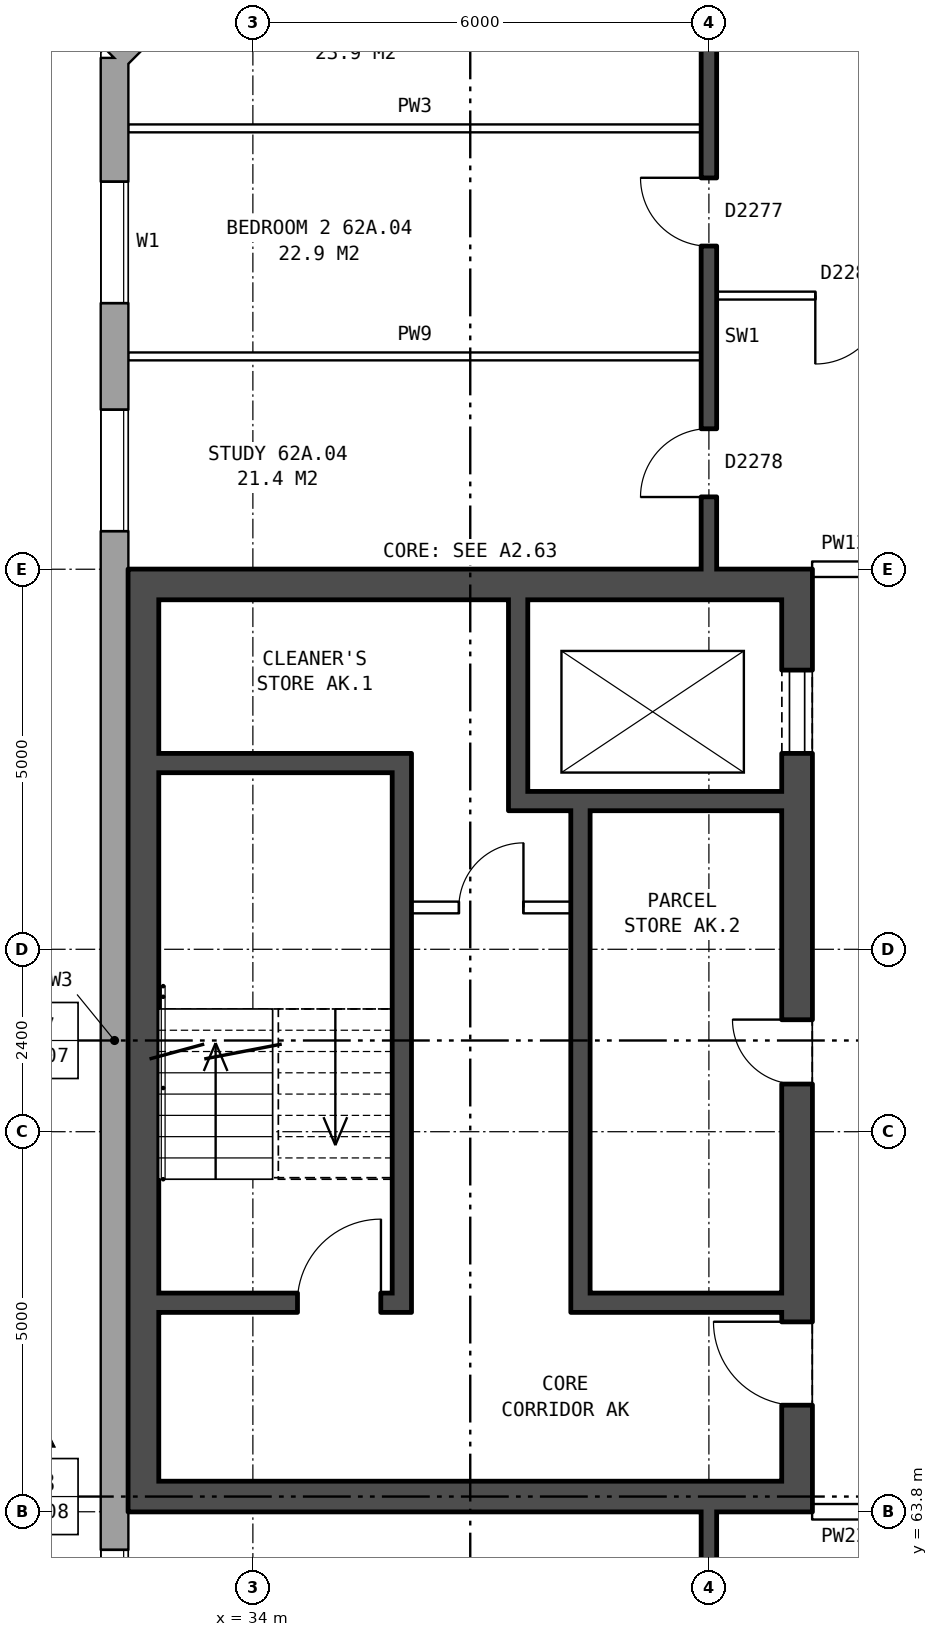
"""IFC4 building model, lengths in metres.
Left out: names, types, materials, properties, quantities, classifications, styles, units other than length and angle.
Written with IfcOpenShell. Run it as: python <this file> out.ifc"""

import sys

from ifc_helpers import new_model, si_unit, direction, frame, frame_2d, origin, place, context, subcontext, project, spatial, rectangle, extrude, element, fill, save


model = new_model("IFC4")
c1 = context("Model", 3, precision=1e-05, world=origin(), true_north=direction((0.0, 1.0)))
c2 = subcontext(c1, "Body", "Model", "MODEL_VIEW")
j1 = project(units=[si_unit("LENGTHUNIT", "METRE"), si_unit("PLANEANGLEUNIT", "RADIAN")], contexts=[c1])
p1 = place(None, origin())
s1 = spatial("IfcSite", under=j1, at=p1, CompositionType="ELEMENT")
p2 = place(p1, origin())
s2 = spatial("IfcBuilding", under=s1, at=p2, CompositionType="ELEMENT")
p3 = place(p2, frame((0.0, 0.0, 221.4)))
s3 = spatial("IfcBuildingStorey", under=s2, at=p3, CompositionType="ELEMENT", Elevation=221.4)
p4 = place(p3, frame((35.075, 85.82, 0.0), z_axis=(0.0, 0.0, 1.0), x_axis=(-0.707106781187, -0.707106781187, 0.0)))
e1 = element("IfcWall", 1, at=p4, inside=s3, PredefinedType="STANDARD", context=c2, shape_type="SweptSolid", body=[
    extrude(rectangle(XDim=4.094, YDim=0.36, at=frame_2d((2.047, 0.0))), origin(), (0.0, 0.0, 1.0), 2.85),
])
p5 = place(p4, frame((1.247, 0.0, 0.8)))
e2 = element("IfcOpeningElement", 2, at=p5, cuts=e1, PredefinedType="OPENING", context=c2, shape_type="SweptSolid", body=[
    extrude(rectangle(XDim=1.6, YDim=1.8, at=frame_2d((0.8, 0.9))), frame((0.0, 0.19, 0.0), z_axis=(0.0, -1.0, 0.0), x_axis=(1.0, 0.0, 0.0)), (0.0, 0.0, 1.0), 0.38),
])
p6 = place(p3, frame((32.18, 82.925, 0.0), z_axis=(0.0, 0.0, 1.0), x_axis=(0.0, -1.0, 0.0)))
e3 = element("IfcWall", 3, at=p6, inside=s3, PredefinedType="STANDARD", context=c2, shape_type="SweptSolid", body=[
    extrude(rectangle(XDim=25.851, YDim=0.36, at=frame_2d((12.925, 0.0))), origin(), (0.0, 0.0, 1.0), 2.85),
])
p7 = place(p6, frame((1.625, 0.0, 0.8)))
e4 = element("IfcOpeningElement", 4, at=p7, cuts=e3, PredefinedType="OPENING", context=c2, shape_type="SweptSolid", body=[
    extrude(rectangle(XDim=1.6, YDim=1.8, at=frame_2d((0.8, 0.9))), frame((0.0, 0.19, 0.0), z_axis=(0.0, -1.0, 0.0), x_axis=(1.0, 0.0, 0.0)), (0.0, 0.0, 1.0), 0.38),
])
p8 = place(p6, frame((4.625, 0.0, 0.8)))
e5 = element("IfcOpeningElement", 5, at=p8, cuts=e3, PredefinedType="OPENING", context=c2, shape_type="SweptSolid", body=[
    extrude(rectangle(XDim=1.6, YDim=1.8, at=frame_2d((0.8, 0.9))), frame((0.0, 0.19, 0.0), z_axis=(0.0, -1.0, 0.0), x_axis=(1.0, 0.0, 0.0)), (0.0, 0.0, 1.0), 0.38),
])
p9 = place(p6, frame((19.625, 0.0, 0.8)))
e6 = element("IfcOpeningElement", 6, at=p9, cuts=e3, PredefinedType="OPENING", context=c2, shape_type="SweptSolid", body=[
    extrude(rectangle(XDim=1.6, YDim=1.8, at=frame_2d((0.8, 0.9))), frame((0.0, 0.19, 0.0), z_axis=(0.0, -1.0, 0.0), x_axis=(1.0, 0.0, 0.0)), (0.0, 0.0, 1.0), 0.38),
])
p10 = place(p6, frame((22.625, 0.0, 0.8)))
e7 = element("IfcOpeningElement", 7, at=p10, cuts=e3, PredefinedType="OPENING", context=c2, shape_type="SweptSolid", body=[
    extrude(rectangle(XDim=1.6, YDim=1.8, at=frame_2d((0.8, 0.9))), frame((0.0, 0.19, 0.0), z_axis=(0.0, -1.0, 0.0), x_axis=(1.0, 0.0, 0.0)), (0.0, 0.0, 1.0), 0.38),
])
p11 = place(p3, frame((41.16, 76.2, 0.0), z_axis=(0.0, 0.0, 1.0), x_axis=(0.0, -1.0, 0.0)))
e8 = element("IfcWall", 8, at=p11, inside=s3, PredefinedType="SHEAR", context=c2, shape_type="SweptSolid", body=[
    extrude(rectangle(XDim=12.4, YDim=0.4, at=frame_2d((6.2, 0.0))), origin(), (0.0, 0.0, 1.0), 2.85),
])
p12 = place(p11, frame((1.325, 0.0, 0.0)))
e9 = element("IfcOpeningElement", 9, at=p12, cuts=e8, PredefinedType="OPENING", context=c2, shape_type="SweptSolid", body=[
    extrude(rectangle(XDim=1.1, YDim=2.1, at=frame_2d((0.55, 1.05))), frame((0.0, 0.21, 0.0), z_axis=(0.0, -1.0, 0.0), x_axis=(1.0, 0.0, 0.0)), (0.0, 0.0, 1.0), 0.42),
])
p13 = place(p11, frame((5.925, 0.0, 0.0)))
e10 = element("IfcOpeningElement", 10, at=p13, cuts=e8, PredefinedType="OPENING", context=c2, shape_type="SweptSolid", body=[
    extrude(rectangle(XDim=0.85, YDim=2.1, at=frame_2d((0.425, 1.05))), frame((0.0, 0.21, 0.0), z_axis=(0.0, -1.0, 0.0), x_axis=(1.0, 0.0, 0.0)), (0.0, 0.0, 1.0), 0.42),
])
p14 = place(p11, frame((9.9, 0.0, 0.0)))
e11 = element("IfcOpeningElement", 11, at=p14, cuts=e8, PredefinedType="OPENING", context=c2, shape_type="SweptSolid", body=[
    extrude(rectangle(XDim=1.1, YDim=2.1, at=frame_2d((0.55, 1.05))), frame((0.0, 0.21, 0.0), z_axis=(0.0, -1.0, 0.0), x_axis=(1.0, 0.0, 0.0)), (0.0, 0.0, 1.0), 0.42),
])
p15 = place(p3, frame((32.56, 76.2, 0.0), z_axis=(0.0, 0.0, 1.0), x_axis=(0.0, -1.0, 0.0)))
e12 = element("IfcWall", 12, at=p15, inside=s3, PredefinedType="SHEAR", context=c2, shape_type="SweptSolid", body=[
    extrude(rectangle(XDim=12.4, YDim=0.4, at=frame_2d((6.2, 0.0))), origin(), (0.0, 0.0, 1.0), 2.85),
])
for number, where, z_axis, x_axis in (
    (13, (40.96, 76.0, 0.0), (0.0, 0.0, 1.0), (-1.0, 0.0, 0.0)),
    (14, (40.96, 64.0, 0.0), (0.0, 0.0, 1.0), (-1.0, 0.0, 0.0)),
):
    element("IfcWall", number, at=place(p3, frame(where, z_axis=z_axis, x_axis=x_axis)), inside=s3, PredefinedType="SHEAR", context=c2, shape_type="SweptSolid", body=[
        extrude(rectangle(XDim=8.2, YDim=0.4, at=frame_2d((4.1, 0.0))), origin(), (0.0, 0.0, 1.0), 2.85),
    ])
p16 = place(p3, frame((35.835, 73.65, 0.0), z_axis=(0.0, 0.0, 1.0), x_axis=(-1.0, 0.0, 0.0)))
e15 = element("IfcWall", 15, at=p16, inside=s3, PredefinedType="SHEAR", context=c2, shape_type="SweptSolid", body=[
    extrude(rectangle(XDim=3.075, YDim=0.25, at=frame_2d((1.538, 0.0))), origin(), (0.0, 0.0, 1.0), 2.85),
])
p17 = place(p3, frame((40.96, 73.15, 0.0), z_axis=(0.0, 0.0, 1.0), x_axis=(-1.0, 0.0, 0.0)))
e16 = element("IfcWall", 16, at=p17, inside=s3, PredefinedType="SHEAR", context=c2, shape_type="SweptSolid", body=[
    extrude(rectangle(XDim=3.595, YDim=0.25, at=frame_2d((1.797, 0.0))), origin(), (0.0, 0.0, 1.0), 2.85),
])
p18 = place(p3, frame((38.185, 71.75, 0.0), z_axis=(0.0, 0.0, 1.0), x_axis=(-1.0, 0.0, 0.0)))
e17 = element("IfcWall", 17, at=p18, inside=s3, PredefinedType="PARTITIONING", context=c2, shape_type="SweptSolid", body=[
    extrude(rectangle(XDim=2.1, YDim=0.15, at=frame_2d((1.05, 0.0))), origin(), (0.0, 0.0, 1.0), 2.85),
])
p19 = place(p18, frame((0.625, 0.0, 0.0)))
e18 = element("IfcOpeningElement", 18, at=p19, cuts=e17, PredefinedType="OPENING", context=c2, shape_type="SweptSolid", body=[
    extrude(rectangle(XDim=0.85, YDim=2.1, at=frame_2d((0.425, 1.05))), frame((0.0, 0.085, 0.0), z_axis=(0.0, -1.0, 0.0), x_axis=(1.0, 0.0, 0.0)), (0.0, 0.0, 1.0), 0.17),
])
p20 = place(p3, frame((40.96, 66.55, 0.0), z_axis=(0.0, 0.0, 1.0), x_axis=(-1.0, 0.0, 0.0)))
e19 = element("IfcWall", 19, at=p20, inside=s3, PredefinedType="SHEAR", context=c2, shape_type="SweptSolid", body=[
    extrude(rectangle(XDim=2.525, YDim=0.25, at=frame_2d((1.262, 0.0))), origin(), (0.0, 0.0, 1.0), 2.85),
])
p21 = place(p3, frame((35.835, 66.55, 0.0), z_axis=(0.0, 0.0, 1.0), x_axis=(-1.0, 0.0, 0.0)))
e20 = element("IfcWall", 20, at=p21, inside=s3, PredefinedType="SHEAR", context=c2, shape_type="SweptSolid", body=[
    extrude(rectangle(XDim=3.075, YDim=0.25, at=frame_2d((1.538, 0.0))), origin(), (0.0, 0.0, 1.0), 2.85),
])
p22 = place(p21, frame((0.15, 0.0, 0.0)))
e21 = element("IfcOpeningElement", 21, at=p22, cuts=e20, PredefinedType="OPENING", context=c2, shape_type="SweptSolid", body=[
    extrude(rectangle(XDim=1.1, YDim=2.1, at=frame_2d((0.55, 1.05))), frame((0.0, 0.135, 0.0), z_axis=(0.0, -1.0, 0.0), x_axis=(1.0, 0.0, 0.0)), (0.0, 0.0, 1.0), 0.27),
])
p23 = place(p3, frame((38.31, 73.025, 0.0), z_axis=(0.0, 0.0, 1.0), x_axis=(0.0, -1.0, 0.0)))
e22 = element("IfcWall", 22, at=p23, inside=s3, PredefinedType="SHEAR", context=c2, shape_type="SweptSolid", body=[
    extrude(rectangle(XDim=6.6, YDim=0.25, at=frame_2d((3.3, 0.0))), origin(), (0.0, 0.0, 1.0), 2.85),
])
p24 = place(p3, frame((37.49, 75.8, 0.0), z_axis=(0.0, 0.0, 1.0), x_axis=(0.0, -1.0, 0.0)))
e23 = element("IfcWall", 23, at=p24, inside=s3, PredefinedType="SHEAR", context=c2, shape_type="SweptSolid", body=[
    extrude(rectangle(XDim=2.525, YDim=0.25, at=frame_2d((1.263, 0.0))), origin(), (0.0, 0.0, 1.0), 2.85),
])
p25 = place(p3, frame((35.96, 73.775, 0.0), z_axis=(0.0, 0.0, 1.0), x_axis=(0.0, -1.0, 0.0)))
e24 = element("IfcWall", 24, at=p25, inside=s3, PredefinedType="SHEAR", context=c2, shape_type="SweptSolid", body=[
    extrude(rectangle(XDim=7.35, YDim=0.25, at=frame_2d((3.675, 0.0))), origin(), (0.0, 0.0, 1.0), 2.85),
])
p26 = place(p3, frame((41.36, 63.8, 0.0), z_axis=(0.0, 0.0, 1.0), x_axis=(1.0, 0.0, 0.0)))
e25 = element("IfcWall", 25, at=p26, inside=s3, PredefinedType="PARTITIONING", context=c2, shape_type="SweptSolid", body=[
    extrude(rectangle(XDim=3.0, YDim=0.2, at=frame_2d((1.5, 0.0))), origin(), (0.0, 0.0, 1.0), 2.85),
])
p27 = place(p26, frame((1.0, 0.0, 0.0)))
e26 = element("IfcOpeningElement", 26, at=p27, cuts=e25, PredefinedType="OPENING", context=c2, shape_type="SweptSolid", body=[
    extrude(rectangle(XDim=1.0, YDim=2.1, at=frame_2d((0.5, 1.05))), frame((0.0, 0.11, 0.0), z_axis=(0.0, -1.0, 0.0), x_axis=(1.0, 0.0, 0.0)), (0.0, 0.0, 1.0), 0.22),
])
p28 = place(p3, frame((41.36, 76.2, 0.0), z_axis=(0.0, 0.0, 1.0), x_axis=(1.0, 0.0, 0.0)))
e27 = element("IfcWall", 27, at=p28, inside=s3, PredefinedType="PARTITIONING", context=c2, shape_type="SweptSolid", body=[
    extrude(rectangle(XDim=3.0, YDim=0.2, at=frame_2d((1.5, 0.0))), origin(), (0.0, 0.0, 1.0), 2.85),
])
p29 = place(p28, frame((1.0, 0.0, 0.0)))
e28 = element("IfcOpeningElement", 28, at=p29, cuts=e27, PredefinedType="OPENING", context=c2, shape_type="SweptSolid", body=[
    extrude(rectangle(XDim=1.0, YDim=2.1, at=frame_2d((0.5, 1.05))), frame((0.0, 0.11, 0.0), z_axis=(0.0, -1.0, 0.0), x_axis=(1.0, 0.0, 0.0)), (0.0, 0.0, 1.0), 0.22),
])
p30 = place(p3, frame((32.36, 79.0, 0.0), z_axis=(0.0, 0.0, 1.0), x_axis=(1.0, 0.0, 0.0)))
e29 = element("IfcWall", 29, at=p30, inside=s3, PredefinedType="PARTITIONING", context=c2, shape_type="SweptSolid", body=[
    extrude(rectangle(XDim=7.54, YDim=0.1, at=frame_2d((3.77, 0.0))), origin(), (0.0, 0.0, 1.0), 2.85),
])
p31 = place(p3, frame((40.1, 79.8, 0.0), z_axis=(0.0, 0.0, 1.0), x_axis=(1.0, 0.0, 0.0)))
e30 = element("IfcWall", 30, at=p31, inside=s3, PredefinedType="PARTITIONING", context=c2, shape_type="SweptSolid", body=[
    extrude(rectangle(XDim=5.8, YDim=0.1, at=frame_2d((2.9, 0.0))), origin(), (0.0, 0.0, 1.0), 2.85),
])
p32 = place(p31, frame((1.3, 0.0, 0.0)))
e31 = element("IfcOpeningElement", 31, at=p32, cuts=e30, PredefinedType="OPENING", context=c2, shape_type="SweptSolid", body=[
    extrude(rectangle(XDim=0.9, YDim=2.1, at=frame_2d((0.45, 1.05))), frame((0.0, 0.06, 0.0), z_axis=(0.0, -1.0, 0.0), x_axis=(1.0, 0.0, 0.0)), (0.0, 0.0, 1.0), 0.12),
])
p33 = place(p31, frame((4.2, 0.0, 0.0)))
e32 = element("IfcOpeningElement", 32, at=p33, cuts=e30, PredefinedType="OPENING", context=c2, shape_type="SweptSolid", body=[
    extrude(rectangle(XDim=0.9, YDim=2.1, at=frame_2d((0.45, 1.05))), frame((0.0, 0.06, 0.0), z_axis=(0.0, -1.0, 0.0), x_axis=(1.0, 0.0, 0.0)), (0.0, 0.0, 1.0), 0.12),
])
p34 = place(p3, frame((32.36, 82.0, 0.0), z_axis=(0.0, 0.0, 1.0), x_axis=(1.0, 0.0, 0.0)))
e33 = element("IfcWall", 33, at=p34, inside=s3, PredefinedType="PARTITIONING", context=c2, shape_type="SweptSolid", body=[
    extrude(rectangle(XDim=7.54, YDim=0.1, at=frame_2d((3.77, 0.0))), origin(), (0.0, 0.0, 1.0), 2.85),
])
p35 = place(p3, frame((40.0, 54.36, 0.0), z_axis=(0.0, 0.0, 1.0), x_axis=(0.0, 1.0, 0.0)))
e34 = element("IfcWall", 34, at=p35, inside=s3, PredefinedType="SOLIDWALL", context=c2, shape_type="SweptSolid", body=[
    extrude(rectangle(XDim=9.44, YDim=0.2, at=frame_2d((4.72, 0.0))), origin(), (0.0, 0.0, 1.0), 2.85),
])
p36 = place(p35, frame((1.37, 0.0, 0.0)))
e35 = element("IfcOpeningElement", 35, at=p36, cuts=e34, PredefinedType="OPENING", context=c2, shape_type="SweptSolid", body=[
    extrude(rectangle(XDim=0.9, YDim=2.1, at=frame_2d((0.45, 1.05))), frame((0.0, 0.11, 0.0), z_axis=(0.0, -1.0, 0.0), x_axis=(1.0, 0.0, 0.0)), (0.0, 0.0, 1.0), 0.22),
])
p37 = place(p35, frame((4.44, 0.0, 0.0)))
e36 = element("IfcOpeningElement", 36, at=p37, cuts=e34, PredefinedType="OPENING", context=c2, shape_type="SweptSolid", body=[
    extrude(rectangle(XDim=0.9, YDim=2.1, at=frame_2d((0.45, 1.05))), frame((0.0, 0.11, 0.0), z_axis=(0.0, -1.0, 0.0), x_axis=(1.0, 0.0, 0.0)), (0.0, 0.0, 1.0), 0.22),
])
p38 = place(p35, frame((7.59, 0.0, 0.0)))
e37 = element("IfcOpeningElement", 37, at=p38, cuts=e34, PredefinedType="OPENING", context=c2, shape_type="SweptSolid", body=[
    extrude(rectangle(XDim=0.9, YDim=2.1, at=frame_2d((0.45, 1.05))), frame((0.0, 0.11, 0.0), z_axis=(0.0, -1.0, 0.0), x_axis=(1.0, 0.0, 0.0)), (0.0, 0.0, 1.0), 0.22),
])
p39 = place(p3, frame((40.0, 76.2, 0.0), z_axis=(0.0, 0.0, 1.0), x_axis=(0.0, 1.0, 0.0)))
e38 = element("IfcWall", 38, at=p39, inside=s3, PredefinedType="SOLIDWALL", context=c2, shape_type="SweptSolid", body=[
    extrude(rectangle(XDim=9.44, YDim=0.2, at=frame_2d((4.72, 0.0))), origin(), (0.0, 0.0, 1.0), 2.85),
])
p40 = place(p39, frame((7.17, 0.0, 0.0)))
e39 = element("IfcOpeningElement", 39, at=p40, cuts=e38, PredefinedType="OPENING", context=c2, shape_type="SweptSolid", body=[
    extrude(rectangle(XDim=0.9, YDim=2.1, at=frame_2d((0.45, 1.05))), frame((0.0, 0.11, 0.0), z_axis=(0.0, -1.0, 0.0), x_axis=(1.0, 0.0, 0.0)), (0.0, 0.0, 1.0), 0.22),
])
p41 = place(p39, frame((4.25, 0.0, 0.0)))
e40 = element("IfcOpeningElement", 40, at=p41, cuts=e38, PredefinedType="OPENING", context=c2, shape_type="SweptSolid", body=[
    extrude(rectangle(XDim=0.9, YDim=2.1, at=frame_2d((0.45, 1.05))), frame((0.0, 0.11, 0.0), z_axis=(0.0, -1.0, 0.0), x_axis=(1.0, 0.0, 0.0)), (0.0, 0.0, 1.0), 0.22),
])
p42 = place(p39, frame((0.95, 0.0, 0.0)))
e41 = element("IfcOpeningElement", 41, at=p42, cuts=e38, PredefinedType="OPENING", context=c2, shape_type="SweptSolid", body=[
    extrude(rectangle(XDim=0.9, YDim=2.1, at=frame_2d((0.45, 1.05))), frame((0.0, 0.11, 0.0), z_axis=(0.0, -1.0, 0.0), x_axis=(1.0, 0.0, 0.0)), (0.0, 0.0, 1.0), 0.22),
])
p43 = place(p7, origin())
e42 = element("IfcWindow", 42, at=p43, inside=s3, PartitioningType="SINGLE_PANEL", PredefinedType="WINDOW", context=c2, shape_type="SweptSolid", body=[
    extrude(rectangle(XDim=1.6, YDim=1.8, at=frame_2d((0.8, 0.9))), frame((0.0, 0.15, 0.0), z_axis=(0.0, -1.0, 0.0), x_axis=(1.0, 0.0, 0.0)), (0.0, 0.0, 1.0), 0.06),
])
fill(e4, e42)
p44 = place(p8, origin())
e43 = element("IfcWindow", 43, at=p44, inside=s3, PartitioningType="SINGLE_PANEL", PredefinedType="WINDOW", context=c2, shape_type="SweptSolid", body=[
    extrude(rectangle(XDim=1.6, YDim=1.8, at=frame_2d((0.8, 0.9))), frame((0.0, 0.15, 0.0), z_axis=(0.0, -1.0, 0.0), x_axis=(1.0, 0.0, 0.0)), (0.0, 0.0, 1.0), 0.06),
])
fill(e5, e43)
p45 = place(p9, origin())
e44 = element("IfcWindow", 44, at=p45, inside=s3, PartitioningType="SINGLE_PANEL", PredefinedType="WINDOW", context=c2, shape_type="SweptSolid", body=[
    extrude(rectangle(XDim=1.6, YDim=1.8, at=frame_2d((0.8, 0.9))), frame((0.0, 0.15, 0.0), z_axis=(0.0, -1.0, 0.0), x_axis=(1.0, 0.0, 0.0)), (0.0, 0.0, 1.0), 0.06),
])
fill(e6, e44)
p46 = place(p12, origin())
e45 = element("IfcDoor", 45, at=p46, inside=s3, OperationType="DOUBLE_DOOR_SLIDING", PredefinedType="DOOR", context=c2, shape_type="SweptSolid", body=[
    extrude(rectangle(XDim=1.1, YDim=2.1, at=frame_2d((0.55, 1.05))), frame((0.0, -0.135, 0.0), z_axis=(0.0, -1.0, 0.0), x_axis=(1.0, 0.0, 0.0)), (0.0, 0.0, 1.0), 0.05),
])
fill(e9, e45)
p47 = place(p13, frame((0.85, 0.0, 0.0), z_axis=(0.0, 0.0, 1.0), x_axis=(-1.0, 0.0, 0.0)))
e46 = element("IfcDoor", 46, at=p47, inside=s3, OperationType="SINGLE_SWING_RIGHT", PredefinedType="DOOR", context=c2, shape_type="SweptSolid", body=[
    extrude(rectangle(XDim=0.85, YDim=2.1, at=frame_2d((0.425, 1.05))), frame((0.0, 0.185, 0.0), z_axis=(0.0, -1.0, 0.0), x_axis=(1.0, 0.0, 0.0)), (0.0, 0.0, 1.0), 0.05),
])
fill(e10, e46)
p48 = place(p14, frame((1.1, 0.0, 0.0), z_axis=(0.0, 0.0, 1.0), x_axis=(-1.0, 0.0, 0.0)))
e47 = element("IfcDoor", 47, at=p48, inside=s3, OperationType="SINGLE_SWING_RIGHT", PredefinedType="DOOR", context=c2, shape_type="SweptSolid", body=[
    extrude(rectangle(XDim=1.1, YDim=2.1, at=frame_2d((0.55, 1.05))), frame((0.0, 0.185, 0.0), z_axis=(0.0, -1.0, 0.0), x_axis=(1.0, 0.0, 0.0)), (0.0, 0.0, 1.0), 0.05),
])
fill(e11, e47)
p49 = place(p22, frame((1.1, 0.0, 0.0), z_axis=(0.0, 0.0, 1.0), x_axis=(-1.0, 0.0, 0.0)))
e48 = element("IfcDoor", 48, at=p49, inside=s3, OperationType="SINGLE_SWING_RIGHT", PredefinedType="DOOR", context=c2, shape_type="SweptSolid", body=[
    extrude(rectangle(XDim=1.1, YDim=2.1, at=frame_2d((0.55, 1.05))), frame((0.0, 0.025, 0.0), z_axis=(0.0, -1.0, 0.0), x_axis=(1.0, 0.0, 0.0)), (0.0, 0.0, 1.0), 0.05),
])
fill(e21, e48)
p50 = place(p19, frame((0.85, 0.0, 0.0), z_axis=(0.0, 0.0, 1.0), x_axis=(-1.0, 0.0, 0.0)))
e49 = element("IfcDoor", 49, at=p50, inside=s3, OperationType="SINGLE_SWING_RIGHT", PredefinedType="DOOR", context=c2, shape_type="SweptSolid", body=[
    extrude(rectangle(XDim=0.85, YDim=2.1, at=frame_2d((0.425, 1.05))), frame((0.0, 0.025, 0.0), z_axis=(0.0, -1.0, 0.0), x_axis=(1.0, 0.0, 0.0)), (0.0, 0.0, 1.0), 0.05),
])
fill(e18, e49)
p51 = place(p41, origin())
e50 = element("IfcDoor", 50, at=p51, inside=s3, OperationType="SINGLE_SWING_RIGHT", PredefinedType="DOOR", context=c2, shape_type="SweptSolid", body=[
    extrude(rectangle(XDim=0.9, YDim=2.1, at=frame_2d((0.45, 1.05))), frame((0.0, 0.025, 0.0), z_axis=(0.0, -1.0, 0.0), x_axis=(1.0, 0.0, 0.0)), (0.0, 0.0, 1.0), 0.05),
])
fill(e40, e50)
p52 = place(p42, origin())
e51 = element("IfcDoor", 51, at=p52, inside=s3, OperationType="SINGLE_SWING_LEFT", PredefinedType="DOOR", context=c2, shape_type="SweptSolid", body=[
    extrude(rectangle(XDim=0.9, YDim=2.1, at=frame_2d((0.45, 1.05))), frame((0.0, 0.025, 0.0), z_axis=(0.0, -1.0, 0.0), x_axis=(1.0, 0.0, 0.0)), (0.0, 0.0, 1.0), 0.05),
])
fill(e41, e51)
p53 = place(p32, frame((0.9, 0.0, 0.0), z_axis=(0.0, 0.0, 1.0), x_axis=(-1.0, 0.0, 0.0)))
e52 = element("IfcDoor", 52, at=p53, inside=s3, OperationType="SINGLE_SWING_RIGHT", PredefinedType="DOOR", context=c2, shape_type="SweptSolid", body=[
    extrude(rectangle(XDim=0.9, YDim=2.1, at=frame_2d((0.45, 1.05))), frame((0.0, 0.025, 0.0), z_axis=(0.0, -1.0, 0.0), x_axis=(1.0, 0.0, 0.0)), (0.0, 0.0, 1.0), 0.05),
])
fill(e31, e52)
save(model, sys.argv[1])
